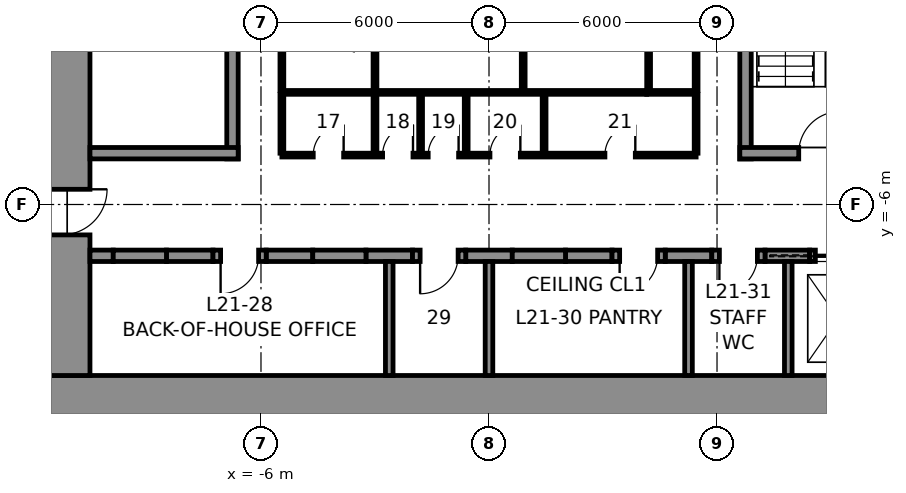
"""IFC4 building model, lengths in metres.
Left out: names, types, materials, properties, quantities, classifications, styles, units other than length and angle.
Written with IfcOpenShell. Run it as: python <this file> out.ifc"""

import sys

from ifc_helpers import new_model, si_unit, direction, frame, frame_2d, origin, place, context, subcontext, project, spatial, rectangle, extrude, element, fill, save


model = new_model("IFC4")
c1 = context("Model", 3, precision=1e-05, world=origin(), true_north=direction((0.0, 1.0)))
c2 = subcontext(c1, "Body", "Model", "MODEL_VIEW")
j1 = project(units=[si_unit("LENGTHUNIT", "METRE"), si_unit("PLANEANGLEUNIT", "RADIAN")], contexts=[c1])
p1 = place(None, origin())
s1 = spatial("IfcSite", under=j1, at=p1, CompositionType="ELEMENT")
p2 = place(p1, origin())
s2 = spatial("IfcBuilding", under=s1, at=p2, CompositionType="ELEMENT")
p3 = place(p2, frame((0.0, 0.0, 109.0)))
s3 = spatial("IfcBuildingStorey", under=s2, at=p3, CompositionType="ELEMENT", Elevation=109.0)
p4 = place(p3, frame((12.0, -11.25, 0.0), z_axis=(0.0, 0.0, 1.0), x_axis=(-1.0, 0.0, 0.0)))
e1 = element("IfcWall", 1, at=p4, inside=s3, PredefinedType="SHEAR", context=c2, shape_type="SweptSolid", body=[
    extrude(rectangle(XDim=24.0, YDim=1.5, at=frame_2d((12.0, 0.0))), origin(), (0.0, 0.0, 1.0), 4.6),
])
p5 = place(p3, frame((-11.25, -10.5, 0.0), z_axis=(0.0, 0.0, 1.0), x_axis=(0.0, 1.0, 0.0)))
e2 = element("IfcWall", 2, at=p5, inside=s3, PredefinedType="SHEAR", context=c2, shape_type="SweptSolid", body=[
    extrude(rectangle(XDim=21.0, YDim=1.5, at=frame_2d((10.5, 0.0))), origin(), (0.0, 0.0, 1.0), 4.6),
])
p6 = place(p5, frame((16.1, 0.0, 0.0)))
e3 = element("IfcOpeningElement", 3, at=p6, cuts=e2, PredefinedType="OPENING", context=c2, shape_type="SweptSolid", body=[
    extrude(rectangle(XDim=1.2, YDim=2.3, at=frame_2d((0.6, 1.15))), frame((0.0, 0.76, 0.0), z_axis=(0.0, -1.0, 0.0), x_axis=(1.0, 0.0, 0.0)), (0.0, 0.0, 1.0), 1.52),
])
p7 = place(p5, frame((3.7, 0.0, 0.0)))
e4 = element("IfcOpeningElement", 4, at=p7, cuts=e2, PredefinedType="OPENING", context=c2, shape_type="SweptSolid", body=[
    extrude(rectangle(XDim=1.2, YDim=2.3, at=frame_2d((0.6, 1.15))), frame((0.0, 0.76, 0.0), z_axis=(0.0, -1.0, 0.0), x_axis=(1.0, 0.0, 0.0)), (0.0, 0.0, 1.0), 1.52),
])
p8 = place(p3, frame((-10.5, -7.35, 0.0), z_axis=(0.0, 0.0, 1.0), x_axis=(1.0, 0.0, 0.0)))
e5 = element("IfcWall", 5, at=p8, inside=s3, PredefinedType="SHEAR", context=c2, shape_type="SweptSolid", body=[
    extrude(rectangle(XDim=0.613, YDim=0.3, at=frame_2d((0.306, 0.0))), origin(), (0.0, 0.0, 1.0), 4.6),
])
for number, where, z_axis, x_axis in (
    (6, (-8.488, -7.35, 0.0), (0.0, 0.0, 1.0), (1.0, 0.0, 0.0)),
    (7, (-5.863, -7.35, 0.0), (0.0, 0.0, 1.0), (1.0, 0.0, 0.0)),
    (8, (-3.238, -7.35, 0.0), (0.0, 0.0, 1.0), (1.0, 0.0, 0.0)),
    (9, (-0.613, -7.35, 0.0), (0.0, 0.0, 1.0), (1.0, 0.0, 0.0)),
    (10, (2.012, -7.35, 0.0), (0.0, 0.0, 1.0), (1.0, 0.0, 0.0)),
    (11, (4.637, -7.35, 0.0), (0.0, 0.0, 1.0), (1.0, 0.0, 0.0)),
):
    element("IfcWall", number, at=place(p3, frame(where, z_axis=z_axis, x_axis=x_axis)), inside=s3, PredefinedType="SHEAR", context=c2, shape_type="SweptSolid", body=[
        extrude(rectangle(XDim=1.225, YDim=0.3, at=frame_2d((0.613, 0.0))), origin(), (0.0, 0.0, 1.0), 4.6),
    ])
p9 = place(p3, frame((7.262, -7.35, 0.0), z_axis=(0.0, 0.0, 1.0), x_axis=(1.0, 0.0, 0.0)))
e12 = element("IfcWall", 12, at=p9, inside=s3, PredefinedType="SHEAR", context=c2, shape_type="SweptSolid", body=[
    extrude(rectangle(XDim=1.175, YDim=0.3, at=frame_2d((0.587, 0.0))), origin(), (0.0, 0.0, 1.0), 4.6),
])
p10 = place(p3, frame((-9.887, -7.35, 0.0), z_axis=(0.0, 0.0, 1.0), x_axis=(1.0, 0.0, 0.0)))
e13 = element("IfcWall", 13, at=p10, inside=s3, PredefinedType="PARTITIONING", context=c2, shape_type="SweptSolid", body=[
    extrude(rectangle(XDim=1.4, YDim=0.3, at=frame_2d((0.7, 0.0))), origin(), (0.0, 0.0, 1.0), 4.6),
])
p11 = place(p3, frame((-7.262, -7.35, 0.0), z_axis=(0.0, 0.0, 1.0), x_axis=(1.0, 0.0, 0.0)))
e14 = element("IfcWall", 14, at=p11, inside=s3, PredefinedType="PARTITIONING", context=c2, shape_type="SweptSolid", body=[
    extrude(rectangle(XDim=1.4, YDim=0.3, at=frame_2d((0.7, 0.0))), origin(), (0.0, 0.0, 1.0), 4.6),
])
p12 = place(p11, frame((0.2, 0.0, 0.0)))
e15 = element("IfcOpeningElement", 15, at=p12, cuts=e14, PredefinedType="OPENING", context=c2, shape_type="SweptSolid", body=[
    extrude(rectangle(XDim=1.0, YDim=2.3, at=frame_2d((0.5, 1.15))), frame((0.0, 0.16, 0.0), z_axis=(0.0, -1.0, 0.0), x_axis=(1.0, 0.0, 0.0)), (0.0, 0.0, 1.0), 0.32),
])
p13 = place(p3, frame((-4.637, -7.35, 0.0), z_axis=(0.0, 0.0, 1.0), x_axis=(1.0, 0.0, 0.0)))
e16 = element("IfcWall", 16, at=p13, inside=s3, PredefinedType="PARTITIONING", context=c2, shape_type="SweptSolid", body=[
    extrude(rectangle(XDim=1.4, YDim=0.3, at=frame_2d((0.7, 0.0))), origin(), (0.0, 0.0, 1.0), 4.6),
])
p14 = place(p3, frame((-2.012, -7.35, 0.0), z_axis=(0.0, 0.0, 1.0), x_axis=(1.0, 0.0, 0.0)))
e17 = element("IfcWall", 17, at=p14, inside=s3, PredefinedType="PARTITIONING", context=c2, shape_type="SweptSolid", body=[
    extrude(rectangle(XDim=1.4, YDim=0.3, at=frame_2d((0.7, 0.0))), origin(), (0.0, 0.0, 1.0), 4.6),
])
p15 = place(p14, frame((0.2, 0.0, 0.0)))
e18 = element("IfcOpeningElement", 18, at=p15, cuts=e17, PredefinedType="OPENING", context=c2, shape_type="SweptSolid", body=[
    extrude(rectangle(XDim=1.0, YDim=2.3, at=frame_2d((0.5, 1.15))), frame((0.0, 0.16, 0.0), z_axis=(0.0, -1.0, 0.0), x_axis=(1.0, 0.0, 0.0)), (0.0, 0.0, 1.0), 0.32),
])
p16 = place(p3, frame((0.613, -7.35, 0.0), z_axis=(0.0, 0.0, 1.0), x_axis=(1.0, 0.0, 0.0)))
e19 = element("IfcWall", 19, at=p16, inside=s3, PredefinedType="PARTITIONING", context=c2, shape_type="SweptSolid", body=[
    extrude(rectangle(XDim=1.4, YDim=0.3, at=frame_2d((0.7, 0.0))), origin(), (0.0, 0.0, 1.0), 4.6),
])
p17 = place(p3, frame((3.238, -7.35, 0.0), z_axis=(0.0, 0.0, 1.0), x_axis=(1.0, 0.0, 0.0)))
e20 = element("IfcWall", 20, at=p17, inside=s3, PredefinedType="PARTITIONING", context=c2, shape_type="SweptSolid", body=[
    extrude(rectangle(XDim=1.4, YDim=0.3, at=frame_2d((0.7, 0.0))), origin(), (0.0, 0.0, 1.0), 4.6),
])
p18 = place(p17, frame((0.2, 0.0, 0.0)))
e21 = element("IfcOpeningElement", 21, at=p18, cuts=e20, PredefinedType="OPENING", context=c2, shape_type="SweptSolid", body=[
    extrude(rectangle(XDim=1.0, YDim=2.3, at=frame_2d((0.5, 1.15))), frame((0.0, 0.16, 0.0), z_axis=(0.0, -1.0, 0.0), x_axis=(1.0, 0.0, 0.0)), (0.0, 0.0, 1.0), 0.32),
])
p19 = place(p3, frame((5.863, -7.35, 0.0), z_axis=(0.0, 0.0, 1.0), x_axis=(1.0, 0.0, 0.0)))
e22 = element("IfcWall", 22, at=p19, inside=s3, PredefinedType="PARTITIONING", context=c2, shape_type="SweptSolid", body=[
    extrude(rectangle(XDim=1.4, YDim=0.3, at=frame_2d((0.7, 0.0))), origin(), (0.0, 0.0, 1.0), 4.6),
])
p20 = place(p19, frame((0.2, 0.0, 0.0)))
e23 = element("IfcOpeningElement", 23, at=p20, cuts=e22, PredefinedType="OPENING", context=c2, shape_type="SweptSolid", body=[
    extrude(rectangle(XDim=1.0, YDim=2.3, at=frame_2d((0.5, 1.15))), frame((0.0, 0.16, 0.0), z_axis=(0.0, -1.0, 0.0), x_axis=(1.0, 0.0, 0.0)), (0.0, 0.0, 1.0), 0.32),
])
p21 = place(p3, frame((8.438, -7.35, 0.0), z_axis=(0.0, 0.0, 1.0), x_axis=(1.0, 0.0, 0.0)))
e24 = element("IfcWall", 24, at=p21, inside=s3, PredefinedType="PARTITIONING", context=c2, shape_type="SweptSolid", body=[
    extrude(rectangle(XDim=1.5, YDim=0.3, at=frame_2d((0.75, 0.0))), origin(), (0.0, 0.0, 1.0), 4.6),
])
p22 = place(p21, frame((0.15, 0.0, 0.0)))
e25 = element("IfcOpeningElement", 25, at=p22, cuts=e24, PredefinedType="OPENING", context=c2, shape_type="SweptSolid", body=[
    extrude(rectangle(XDim=1.2, YDim=2.3, at=frame_2d((0.6, 1.15))), frame((0.0, 0.16, 0.0), z_axis=(0.0, -1.0, 0.0), x_axis=(1.0, 0.0, 0.0)), (0.0, 0.0, 1.0), 0.32),
])
for number, where, z_axis, x_axis in (
    (26, (-2.625, -10.5, 0.0), (0.0, 0.0, 1.0), (0.0, 1.0, 0.0)),
    (27, (0.0, -10.5, 0.0), (0.0, 0.0, 1.0), (0.0, 1.0, 0.0)),
    (28, (5.25, -10.5, 0.0), (0.0, 0.0, 1.0), (0.0, 1.0, 0.0)),
    (29, (7.875, -10.5, 0.0), (0.0, 0.0, 1.0), (0.0, 1.0, 0.0)),
):
    element("IfcWall", number, at=place(p3, frame(where, z_axis=z_axis, x_axis=x_axis)), inside=s3, PredefinedType="PARTITIONING", context=c2, shape_type="SweptSolid", body=[
        extrude(rectangle(XDim=3.0, YDim=0.2, at=frame_2d((1.5, 0.0))), origin(), (0.0, 0.0, 1.0), 4.6),
    ])
p23 = place(p3, frame((-6.75, -4.8, 0.0), z_axis=(0.0, 0.0, 1.0), x_axis=(0.0, 1.0, 0.0)))
e30 = element("IfcWall", 30, at=p23, inside=s3, PredefinedType="SOLIDWALL", context=c2, shape_type="SweptSolid", body=[
    extrude(rectangle(XDim=9.6, YDim=0.3, at=frame_2d((4.8, 0.0))), origin(), (0.0, 0.0, 1.0), 4.35),
])
p24 = place(p3, frame((-6.6, -4.65, 0.0), z_axis=(0.0, 0.0, 1.0), x_axis=(-1.0, 0.0, 0.0)))
e31 = element("IfcWall", 31, at=p24, inside=s3, PredefinedType="SOLIDWALL", context=c2, shape_type="SweptSolid", body=[
    extrude(rectangle(XDim=3.9, YDim=0.3, at=frame_2d((1.95, 0.0))), origin(), (0.0, 0.0, 1.0), 4.35),
])
p25 = place(p3, frame((6.75, -4.8, 0.0), z_axis=(0.0, 0.0, 1.0), x_axis=(0.0, 1.0, 0.0)))
e32 = element("IfcWall", 32, at=p25, inside=s3, PredefinedType="SOLIDWALL", context=c2, shape_type="SweptSolid", body=[
    extrude(rectangle(XDim=9.6, YDim=0.3, at=frame_2d((4.8, 0.0))), origin(), (0.0, 0.0, 1.0), 4.35),
])
p26 = place(p3, frame((10.5, -4.65, 0.0), z_axis=(0.0, 0.0, 1.0), x_axis=(-1.0, 0.0, 0.0)))
e33 = element("IfcWall", 33, at=p26, inside=s3, PredefinedType="SOLIDWALL", context=c2, shape_type="SweptSolid", body=[
    extrude(rectangle(XDim=3.9, YDim=0.3, at=frame_2d((1.95, 0.0))), origin(), (0.0, 0.0, 1.0), 4.35),
])
p27 = place(p26, frame((1.25, 0.0, 0.0)))
e34 = element("IfcOpeningElement", 34, at=p27, cuts=e33, PredefinedType="OPENING", context=c2, shape_type="SweptSolid", body=[
    extrude(rectangle(XDim=1.1, YDim=2.3, at=frame_2d((0.55, 1.15))), frame((0.0, 0.16, 0.0), z_axis=(0.0, -1.0, 0.0), x_axis=(1.0, 0.0, 0.0)), (0.0, 0.0, 1.0), 0.32),
])
p28 = place(p3, frame((4.15, -3.05, 0.0), z_axis=(0.0, 0.0, 1.0), x_axis=(-1.0, 0.0, 0.0)))
e35 = element("IfcWall", 35, at=p28, inside=s3, PredefinedType="PARTITIONING", context=c2, shape_type="SweptSolid", body=[
    extrude(rectangle(XDim=9.6, YDim=0.1, at=frame_2d((4.8, 0.0))), origin(), (0.0, 0.0, 1.0), 4.35),
])
p29 = place(p3, frame((5.45, -3.05, 0.0), z_axis=(0.0, 0.0, 1.0), x_axis=(-1.0, 0.0, 0.0)))
e36 = element("IfcWall", 36, at=p29, inside=s3, PredefinedType="PARTITIONING", context=c2, shape_type="SweptSolid", body=[
    extrude(rectangle(XDim=1.3, YDim=0.1, at=frame_2d((0.65, 0.0))), origin(), (0.0, 0.0, 1.0), 4.35),
])
for number, where, z_axis, x_axis in (
    (37, (5.45, 3.0, 0.0), (0.0, 0.0, 1.0), (0.0, -1.0, 0.0)),
    (38, (-5.45, -3.0, 0.0), (0.0, 0.0, 1.0), (0.0, 1.0, 0.0)),
    (39, (-3.0, -3.0, 0.0), (0.0, 0.0, 1.0), (0.0, 1.0, 0.0)),
    (40, (0.9, -3.0, 0.0), (0.0, 0.0, 1.0), (0.0, 1.0, 0.0)),
    (41, (4.2, -3.0, 0.0), (0.0, 0.0, 1.0), (0.0, 1.0, 0.0)),
):
    element("IfcWall", number, at=place(p3, frame(where, z_axis=z_axis, x_axis=x_axis)), inside=s3, PredefinedType="PARTITIONING", context=c2, shape_type="SweptSolid", body=[
        extrude(rectangle(XDim=6.0, YDim=0.1, at=frame_2d((3.0, 0.0))), origin(), (0.0, 0.0, 1.0), 4.35),
    ])
p30 = place(p3, frame((5.45, -4.7, 0.0), z_axis=(0.0, 0.0, 1.0), x_axis=(-1.0, 0.0, 0.0)))
e42 = element("IfcWall", 42, at=p30, inside=s3, PredefinedType="PARTITIONING", context=c2, shape_type="SweptSolid", body=[
    extrude(rectangle(XDim=10.9, YDim=0.1, at=frame_2d((5.45, 0.0))), origin(), (0.0, 0.0, 1.0), 4.35),
])
p31 = place(p30, frame((9.275, 0.0, 0.0)))
e43 = element("IfcOpeningElement", 43, at=p31, cuts=e42, PredefinedType="OPENING", context=c2, shape_type="SweptSolid", body=[
    extrude(rectangle(XDim=0.8, YDim=2.3, at=frame_2d((0.4, 1.15))), frame((0.0, 0.06, 0.0), z_axis=(0.0, -1.0, 0.0), x_axis=(1.0, 0.0, 0.0)), (0.0, 0.0, 1.0), 0.12),
])
p32 = place(p30, frame((7.45, 0.0, 0.0)))
e44 = element("IfcOpeningElement", 44, at=p32, cuts=e42, PredefinedType="OPENING", context=c2, shape_type="SweptSolid", body=[
    extrude(rectangle(XDim=0.8, YDim=2.3, at=frame_2d((0.4, 1.15))), frame((0.0, 0.06, 0.0), z_axis=(0.0, -1.0, 0.0), x_axis=(1.0, 0.0, 0.0)), (0.0, 0.0, 1.0), 0.12),
])
p33 = place(p30, frame((6.25, 0.0, 0.0)))
e45 = element("IfcOpeningElement", 45, at=p33, cuts=e42, PredefinedType="OPENING", context=c2, shape_type="SweptSolid", body=[
    extrude(rectangle(XDim=0.8, YDim=2.3, at=frame_2d((0.4, 1.15))), frame((0.0, 0.06, 0.0), z_axis=(0.0, -1.0, 0.0), x_axis=(1.0, 0.0, 0.0)), (0.0, 0.0, 1.0), 0.12),
])
p34 = place(p30, frame((4.625, 0.0, 0.0)))
e46 = element("IfcOpeningElement", 46, at=p34, cuts=e42, PredefinedType="OPENING", context=c2, shape_type="SweptSolid", body=[
    extrude(rectangle(XDim=0.8, YDim=2.3, at=frame_2d((0.4, 1.15))), frame((0.0, 0.06, 0.0), z_axis=(0.0, -1.0, 0.0), x_axis=(1.0, 0.0, 0.0)), (0.0, 0.0, 1.0), 0.12),
])
p35 = place(p30, frame((1.6, 0.0, 0.0)))
e47 = element("IfcOpeningElement", 47, at=p35, cuts=e42, PredefinedType="OPENING", context=c2, shape_type="SweptSolid", body=[
    extrude(rectangle(XDim=0.8, YDim=2.3, at=frame_2d((0.4, 1.15))), frame((0.0, 0.06, 0.0), z_axis=(0.0, -1.0, 0.0), x_axis=(1.0, 0.0, 0.0)), (0.0, 0.0, 1.0), 0.12),
])
for number, where, z_axis, x_axis in (
    (48, (-5.45, -3.1, 0.0), (0.0, 0.0, 1.0), (0.0, -1.0, 0.0)),
    (49, (5.45, -3.1, 0.0), (0.0, 0.0, 1.0), (0.0, -1.0, 0.0)),
    (50, (-3.0, -3.1, 0.0), (0.0, 0.0, 1.0), (0.0, -1.0, 0.0)),
    (51, (-1.8, -3.1, 0.0), (0.0, 0.0, 1.0), (0.0, -1.0, 0.0)),
    (52, (-0.6, -3.1, 0.0), (0.0, 0.0, 1.0), (0.0, -1.0, 0.0)),
    (53, (1.45, -3.1, 0.0), (0.0, 0.0, 1.0), (0.0, -1.0, 0.0)),
):
    element("IfcWall", number, at=place(p3, frame(where, z_axis=z_axis, x_axis=x_axis)), inside=s3, PredefinedType="PARTITIONING", context=c2, shape_type="SweptSolid", body=[
        extrude(rectangle(XDim=1.55, YDim=0.1, at=frame_2d((0.775, 0.0))), origin(), (0.0, 0.0, 1.0), 4.35),
    ])
p36 = place(p27, frame((1.1, 0.0, 0.0), z_axis=(0.0, 0.0, 1.0), x_axis=(-1.0, 0.0, 0.0)))
e54 = element("IfcDoor", 54, at=p36, inside=s3, OperationType="SINGLE_SWING_RIGHT", PredefinedType="DOOR", context=c2, shape_type="SweptSolid", body=[
    extrude(rectangle(XDim=1.1, YDim=2.3, at=frame_2d((0.55, 1.15))), frame((0.0, 0.025, 0.0), z_axis=(0.0, -1.0, 0.0), x_axis=(1.0, 0.0, 0.0)), (0.0, 0.0, 1.0), 0.05),
])
fill(e34, e54)
p37 = place(p31, frame((0.8, 0.0, 0.0), z_axis=(0.0, 0.0, 1.0), x_axis=(-1.0, 0.0, 0.0)))
e55 = element("IfcDoor", 55, at=p37, inside=s3, OperationType="SINGLE_SWING_RIGHT", PredefinedType="DOOR", context=c2, shape_type="SweptSolid", body=[
    extrude(rectangle(XDim=0.8, YDim=2.3, at=frame_2d((0.4, 1.15))), frame((0.0, 0.025, 0.0), z_axis=(0.0, -1.0, 0.0), x_axis=(1.0, 0.0, 0.0)), (0.0, 0.0, 1.0), 0.05),
])
fill(e43, e55)
p38 = place(p32, frame((0.8, 0.0, 0.0), z_axis=(0.0, 0.0, 1.0), x_axis=(-1.0, 0.0, 0.0)))
e56 = element("IfcDoor", 56, at=p38, inside=s3, OperationType="SINGLE_SWING_RIGHT", PredefinedType="DOOR", context=c2, shape_type="SweptSolid", body=[
    extrude(rectangle(XDim=0.8, YDim=2.3, at=frame_2d((0.4, 1.15))), frame((0.0, 0.025, 0.0), z_axis=(0.0, -1.0, 0.0), x_axis=(1.0, 0.0, 0.0)), (0.0, 0.0, 1.0), 0.05),
])
fill(e44, e56)
p39 = place(p33, frame((0.8, 0.0, 0.0), z_axis=(0.0, 0.0, 1.0), x_axis=(-1.0, 0.0, 0.0)))
e57 = element("IfcDoor", 57, at=p39, inside=s3, OperationType="SINGLE_SWING_RIGHT", PredefinedType="DOOR", context=c2, shape_type="SweptSolid", body=[
    extrude(rectangle(XDim=0.8, YDim=2.3, at=frame_2d((0.4, 1.15))), frame((0.0, 0.025, 0.0), z_axis=(0.0, -1.0, 0.0), x_axis=(1.0, 0.0, 0.0)), (0.0, 0.0, 1.0), 0.05),
])
fill(e45, e57)
p40 = place(p34, frame((0.8, 0.0, 0.0), z_axis=(0.0, 0.0, 1.0), x_axis=(-1.0, 0.0, 0.0)))
e58 = element("IfcDoor", 58, at=p40, inside=s3, OperationType="SINGLE_SWING_RIGHT", PredefinedType="DOOR", context=c2, shape_type="SweptSolid", body=[
    extrude(rectangle(XDim=0.8, YDim=2.3, at=frame_2d((0.4, 1.15))), frame((0.0, 0.025, 0.0), z_axis=(0.0, -1.0, 0.0), x_axis=(1.0, 0.0, 0.0)), (0.0, 0.0, 1.0), 0.05),
])
fill(e46, e58)
p41 = place(p35, frame((0.8, 0.0, 0.0), z_axis=(0.0, 0.0, 1.0), x_axis=(-1.0, 0.0, 0.0)))
e59 = element("IfcDoor", 59, at=p41, inside=s3, OperationType="SINGLE_SWING_RIGHT", PredefinedType="DOOR", context=c2, shape_type="SweptSolid", body=[
    extrude(rectangle(XDim=0.8, YDim=2.3, at=frame_2d((0.4, 1.15))), frame((0.0, 0.025, 0.0), z_axis=(0.0, -1.0, 0.0), x_axis=(1.0, 0.0, 0.0)), (0.0, 0.0, 1.0), 0.05),
])
fill(e47, e59)
p42 = place(p12, frame((1.0, 0.0, 0.0), z_axis=(0.0, 0.0, 1.0), x_axis=(-1.0, 0.0, 0.0)))
e60 = element("IfcDoor", 60, at=p42, inside=s3, OperationType="SINGLE_SWING_RIGHT", PredefinedType="DOOR", context=c2, shape_type="SweptSolid", body=[
    extrude(rectangle(XDim=1.0, YDim=2.3, at=frame_2d((0.5, 1.15))), frame((0.0, 0.025, 0.0), z_axis=(0.0, -1.0, 0.0), x_axis=(1.0, 0.0, 0.0)), (0.0, 0.0, 1.0), 0.05),
])
fill(e15, e60)
p43 = place(p15, frame((1.0, 0.0, 0.0), z_axis=(0.0, 0.0, 1.0), x_axis=(-1.0, 0.0, 0.0)))
e61 = element("IfcDoor", 61, at=p43, inside=s3, OperationType="SINGLE_SWING_RIGHT", PredefinedType="DOOR", context=c2, shape_type="SweptSolid", body=[
    extrude(rectangle(XDim=1.0, YDim=2.3, at=frame_2d((0.5, 1.15))), frame((0.0, 0.025, 0.0), z_axis=(0.0, -1.0, 0.0), x_axis=(1.0, 0.0, 0.0)), (0.0, 0.0, 1.0), 0.05),
])
fill(e18, e61)
p44 = place(p18, frame((1.0, 0.0, 0.0), z_axis=(0.0, 0.0, 1.0), x_axis=(-1.0, 0.0, 0.0)))
e62 = element("IfcDoor", 62, at=p44, inside=s3, OperationType="SINGLE_SWING_RIGHT", PredefinedType="DOOR", context=c2, shape_type="SweptSolid", body=[
    extrude(rectangle(XDim=1.0, YDim=2.3, at=frame_2d((0.5, 1.15))), frame((0.0, 0.025, 0.0), z_axis=(0.0, -1.0, 0.0), x_axis=(1.0, 0.0, 0.0)), (0.0, 0.0, 1.0), 0.05),
])
fill(e21, e62)
p45 = place(p20, frame((1.0, 0.0, 0.0), z_axis=(0.0, 0.0, 1.0), x_axis=(-1.0, 0.0, 0.0)))
e63 = element("IfcDoor", 63, at=p45, inside=s3, OperationType="SINGLE_SWING_RIGHT", PredefinedType="DOOR", context=c2, shape_type="SweptSolid", body=[
    extrude(rectangle(XDim=1.0, YDim=2.3, at=frame_2d((0.5, 1.15))), frame((0.0, 0.025, 0.0), z_axis=(0.0, -1.0, 0.0), x_axis=(1.0, 0.0, 0.0)), (0.0, 0.0, 1.0), 0.05),
])
fill(e23, e63)
p46 = place(p7, frame((1.2, 0.0, 0.0), z_axis=(0.0, 0.0, 1.0), x_axis=(-1.0, 0.0, 0.0)))
e64 = element("IfcDoor", 64, at=p46, inside=s3, OperationType="SINGLE_SWING_LEFT", PredefinedType="DOOR", context=c2, shape_type="SweptSolid", body=[
    extrude(rectangle(XDim=1.2, YDim=2.3, at=frame_2d((0.6, 1.15))), frame((0.0, 0.025, 0.0), z_axis=(0.0, -1.0, 0.0), x_axis=(1.0, 0.0, 0.0)), (0.0, 0.0, 1.0), 0.05),
])
fill(e4, e64)
p47 = place(p22, origin())
e65 = element("IfcDoor", 65, at=p47, inside=s3, OperationType="SLIDING_TO_LEFT", PredefinedType="DOOR", context=c2, shape_type="SweptSolid", body=[
    extrude(rectangle(XDim=1.2, YDim=2.3, at=frame_2d((0.6, 1.15))), frame((0.0, 0.025, 0.0), z_axis=(0.0, -1.0, 0.0), x_axis=(1.0, 0.0, 0.0)), (0.0, 0.0, 1.0), 0.05),
])
fill(e25, e65)
save(model, sys.argv[1])
